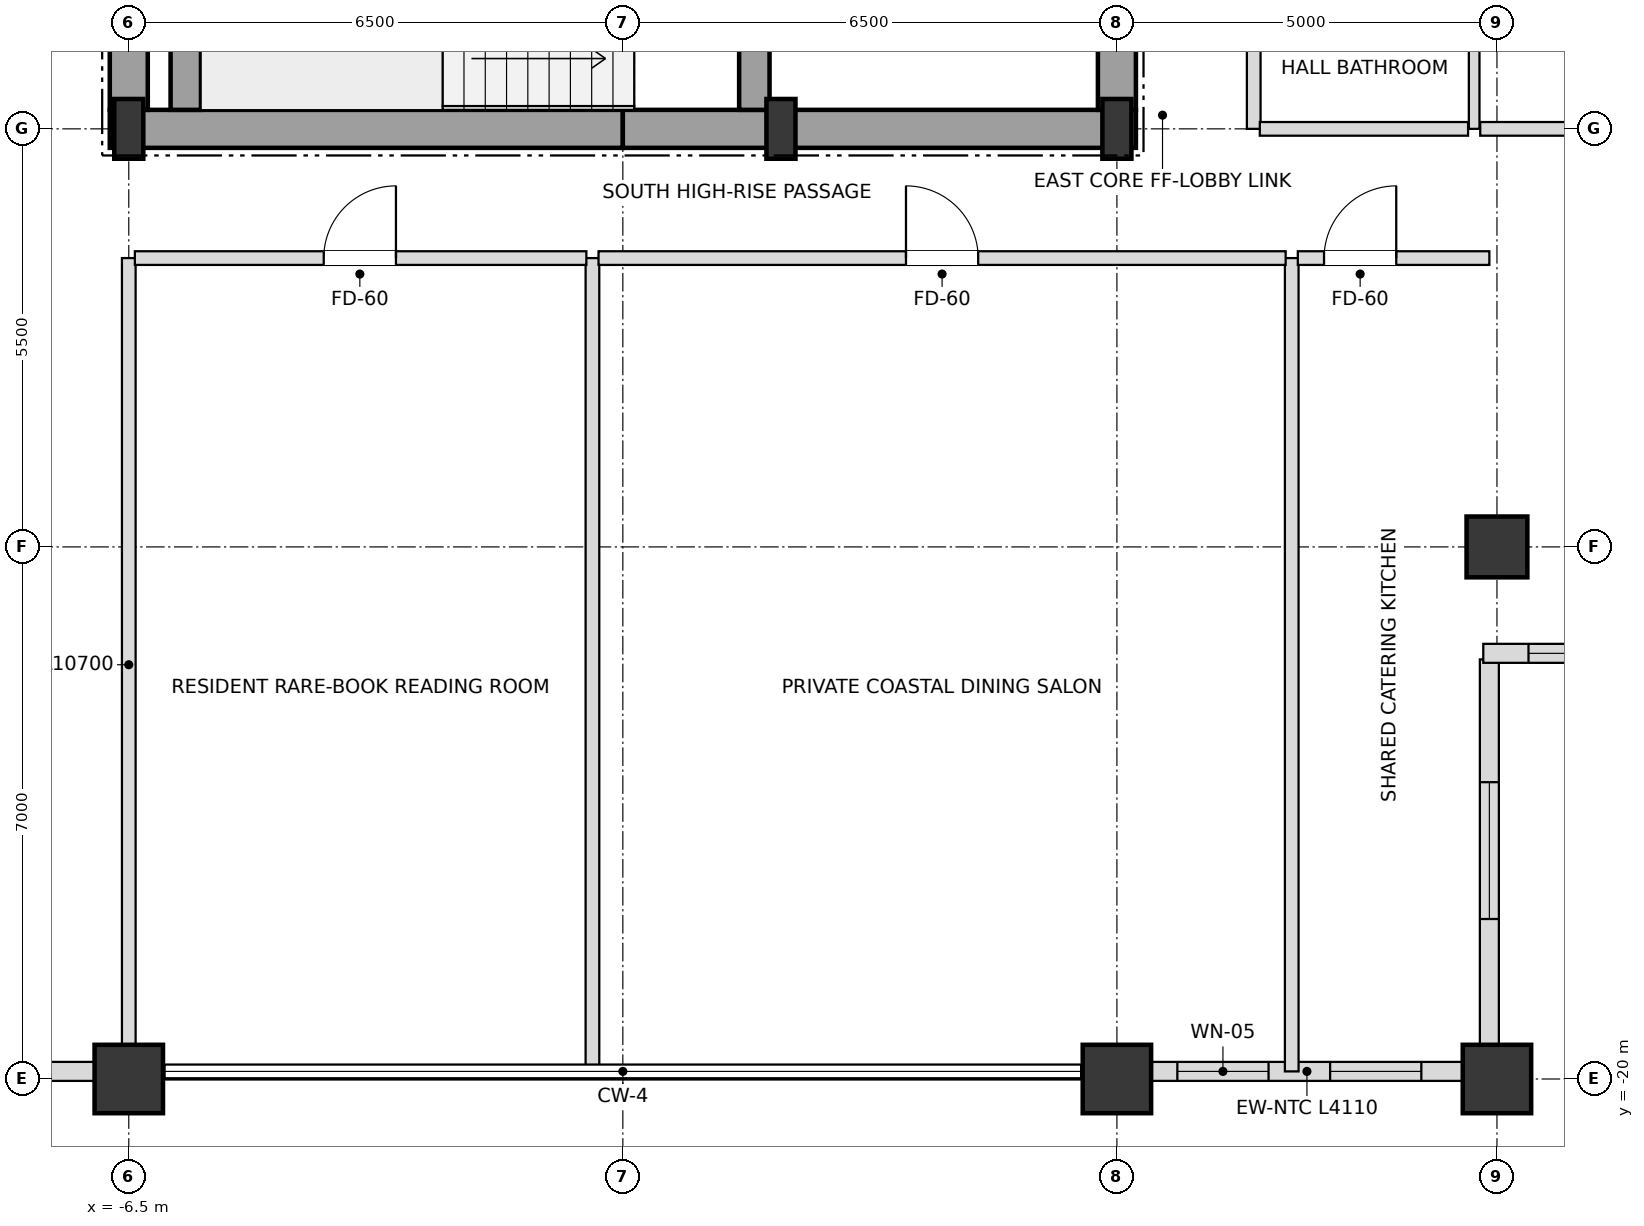
"""IFC4 building model, lengths in metres.
Left out: names, types, materials, properties, quantities, classifications, styles, units other than length and angle.
Written with IfcOpenShell. Run it as: python <this file> out.ifc"""

import sys

from ifc_helpers import new_model, si_unit, direction, frame, frame_2d, origin, origin_2d, place, context, subcontext, project, spatial, rectangle, i_section, extrude, element, fill, save


model = new_model("IFC4")
c1 = context("Model", 3, precision=1e-05, world=origin(), true_north=direction((0.0, 1.0)))
c2 = subcontext(c1, "Body", "Model", "MODEL_VIEW")
j1 = project(units=[si_unit("LENGTHUNIT", "METRE"), si_unit("PLANEANGLEUNIT", "RADIAN")], contexts=[c1])
p1 = place(None, origin())
s1 = spatial("IfcSite", under=j1, at=p1, CompositionType="ELEMENT")
p2 = place(p1, origin())
s2 = spatial("IfcBuilding", under=s1, at=p2, CompositionType="ELEMENT")
p3 = place(p2, frame((0.0, 0.0, 279.9)))
s3 = spatial("IfcBuildingStorey", under=s2, at=p3, CompositionType="ELEMENT", Elevation=279.9)
for number, where, z_axis, x_axis in (
    (1, (-6.5, -7.5, 0.0), (0.0, 0.0, 1.0), (1.0, 0.0, 0.0)),
    (2, (2.08, -7.5, 0.0), (0.0, 0.0, 1.0), (1.0, 0.0, 0.0)),
    (3, (6.5, -7.5, 0.0), (0.0, 0.0, 1.0), (1.0, 0.0, 0.0)),
):
    element("IfcColumn", number, at=place(p3, frame(where, z_axis=z_axis, x_axis=x_axis)), inside=s3, PredefinedType="COLUMN", context=c2, shape_type="SweptSolid", body=[
        extrude(i_section(OverallWidth=0.382, OverallDepth=0.786, WebThickness=0.02, FlangeThickness=0.033, at=origin_2d()), origin(), (0.0, 0.0, 1.0), 3.6),
    ])
for number, where, z_axis, x_axis in (
    (4, (-6.5, -20.0, 0.0), (0.0, 0.0, 1.0), (1.0, 0.0, 0.0)),
    (5, (6.5, -20.0, 0.0), (0.0, 0.0, 1.0), (1.0, 0.0, 0.0)),
    (6, (11.5, -20.0, 0.0), (0.0, 0.0, 1.0), (1.0, 0.0, 0.0)),
):
    element("IfcColumn", number, at=place(p3, frame(where, z_axis=z_axis, x_axis=x_axis)), inside=s3, PredefinedType="USERDEFINED", context=c2, shape_type="SweptSolid", body=[
        extrude(rectangle(XDim=0.9, YDim=0.9, at=origin_2d()), origin(), (0.0, 0.0, 1.0), 3.6),
    ])
p4 = place(p3, frame((11.5, -13.0, 0.0), z_axis=(0.0, 0.0, 1.0), x_axis=(1.0, 0.0, 0.0)))
e7 = element("IfcColumn", 7, at=p4, inside=s3, PredefinedType="COLUMN", context=c2, shape_type="SweptSolid", body=[
    extrude(rectangle(XDim=0.8, YDim=0.8, at=origin_2d()), origin(), (0.0, 0.0, 1.0), 3.6),
])
p5 = place(p3, frame((-11.055, -19.9, 0.0), z_axis=(0.0, 0.0, 1.0), x_axis=(1.0, 0.0, 0.0)))
e8 = element("IfcWall", 8, at=p5, inside=s3, PredefinedType="SOLIDWALL", context=c2, shape_type="SweptSolid", body=[
    extrude(rectangle(XDim=4.11, YDim=0.25, at=frame_2d((2.055, 0.0))), origin(), (0.0, 0.0, 1.0), 2.748),
])
p6 = place(p5, frame((1.155, 0.0, 0.72)))
e9 = element("IfcOpeningElement", 9, at=p6, cuts=e8, PredefinedType="OPENING", context=c2, shape_type="SweptSolid", body=[
    extrude(rectangle(XDim=1.8, YDim=1.68, at=frame_2d((0.9, 0.84))), frame((0.0, 0.135, 0.0), z_axis=(0.0, -1.0, 0.0), x_axis=(1.0, 0.0, 0.0)), (0.0, 0.0, 1.0), 0.27),
])
p7 = place(p3, frame((6.945, -19.9, 0.0), z_axis=(0.0, 0.0, 1.0), x_axis=(1.0, 0.0, 0.0)))
e10 = element("IfcWall", 10, at=p7, inside=s3, PredefinedType="SOLIDWALL", context=c2, shape_type="SweptSolid", body=[
    extrude(rectangle(XDim=4.11, YDim=0.25, at=frame_2d((2.055, 0.0))), origin(), (0.0, 0.0, 1.0), 2.748),
])
p8 = place(p7, frame((0.35, 0.0, 0.72)))
e11 = element("IfcOpeningElement", 11, at=p8, cuts=e10, PredefinedType="OPENING", context=c2, shape_type="SweptSolid", body=[
    extrude(rectangle(XDim=1.2, YDim=1.68, at=frame_2d((0.6, 0.84))), frame((0.0, 0.135, 0.0), z_axis=(0.0, -1.0, 0.0), x_axis=(1.0, 0.0, 0.0)), (0.0, 0.0, 1.0), 0.27),
])
p9 = place(p7, frame((2.36, 0.0, 0.72)))
e12 = element("IfcOpeningElement", 12, at=p9, cuts=e10, PredefinedType="OPENING", context=c2, shape_type="SweptSolid", body=[
    extrude(rectangle(XDim=1.2, YDim=1.68, at=frame_2d((0.6, 0.84))), frame((0.0, 0.135, 0.0), z_axis=(0.0, -1.0, 0.0), x_axis=(1.0, 0.0, 0.0)), (0.0, 0.0, 1.0), 0.27),
])
p10 = place(p3, frame((11.4, -19.82, 0.0), z_axis=(0.0, 0.0, 1.0), x_axis=(0.0, 1.0, 0.0)))
e13 = element("IfcWall", 13, at=p10, inside=s3, PredefinedType="SOLIDWALL", context=c2, shape_type="SweptSolid", body=[
    extrude(rectangle(XDim=5.34, YDim=0.25, at=frame_2d((2.67, 0.0))), origin(), (0.0, 0.0, 1.0), 2.748),
])
p11 = place(p10, frame((1.925, 0.0, 0.72)))
e14 = element("IfcOpeningElement", 14, at=p11, cuts=e13, PredefinedType="OPENING", context=c2, shape_type="SweptSolid", body=[
    extrude(rectangle(XDim=1.8, YDim=1.68, at=frame_2d((0.9, 0.84))), frame((0.0, 0.135, 0.0), z_axis=(0.0, -1.0, 0.0), x_axis=(1.0, 0.0, 0.0)), (0.0, 0.0, 1.0), 0.27),
])
p12 = place(p3, frame((11.32, -14.4, 0.0), z_axis=(0.0, 0.0, 1.0), x_axis=(1.0, 0.0, 0.0)))
e15 = element("IfcWall", 15, at=p12, inside=s3, PredefinedType="SOLIDWALL", context=c2, shape_type="SweptSolid", body=[
    extrude(rectangle(XDim=5.66, YDim=0.25, at=frame_2d((2.83, 0.0))), origin(), (0.0, 0.0, 1.0), 2.748),
])
p13 = place(p12, frame((0.595, 0.0, 0.72)))
e16 = element("IfcOpeningElement", 16, at=p13, cuts=e15, PredefinedType="OPENING", context=c2, shape_type="SweptSolid", body=[
    extrude(rectangle(XDim=1.8, YDim=1.68, at=frame_2d((0.9, 0.84))), frame((0.0, 0.135, 0.0), z_axis=(0.0, -1.0, 0.0), x_axis=(1.0, 0.0, 0.0)), (0.0, 0.0, 1.0), 0.27),
])
p14 = place(p12, frame((3.265, 0.0, 0.72)))
e17 = element("IfcOpeningElement", 17, at=p14, cuts=e15, PredefinedType="OPENING", context=c2, shape_type="SweptSolid", body=[
    extrude(rectangle(XDim=1.8, YDim=1.68, at=frame_2d((0.9, 0.84))), frame((0.0, 0.135, 0.0), z_axis=(0.0, -1.0, 0.0), x_axis=(1.0, 0.0, 0.0)), (0.0, 0.0, 1.0), 0.27),
])
for number, where, z_axis, x_axis in (
    (18, (-6.75, -7.5, 0.0), (0.0, 0.0, 1.0), (1.0, 0.0, 0.0)),
    (19, (0.0, -7.5, 0.0), (0.0, 0.0, 1.0), (1.0, 0.0, 0.0)),
):
    element("IfcWall", number, at=place(p3, frame(where, z_axis=z_axis, x_axis=x_axis)), inside=s3, PredefinedType="SHEAR", context=c2, shape_type="SweptSolid", body=[
        extrude(rectangle(XDim=6.75, YDim=0.5, at=frame_2d((3.375, 0.0))), origin(), (0.0, 0.0, 1.0), 3.38),
    ])
p15 = place(p3, frame((-6.5, -7.25, 0.0), z_axis=(0.0, 0.0, 1.0), x_axis=(0.0, 1.0, 0.0)))
e20 = element("IfcWall", 20, at=p15, inside=s3, PredefinedType="SHEAR", context=c2, shape_type="SweptSolid", body=[
    extrude(rectangle(XDim=3.55, YDim=0.5, at=frame_2d((1.775, 0.0))), origin(), (0.0, 0.0, 1.0), 3.38),
])
p16 = place(p3, frame((6.5, -7.25, 0.0), z_axis=(0.0, 0.0, 1.0), x_axis=(0.0, 1.0, 0.0)))
e21 = element("IfcWall", 21, at=p16, inside=s3, PredefinedType="SHEAR", context=c2, shape_type="SweptSolid", body=[
    extrude(rectangle(XDim=5.75, YDim=0.5, at=frame_2d((2.875, 0.0))), origin(), (0.0, 0.0, 1.0), 3.38),
])
p17 = place(p16, frame((0.85, 0.0, 0.0)))
e22 = element("IfcOpeningElement", 22, at=p17, cuts=e21, PredefinedType="OPENING", context=c2, shape_type="SweptSolid", body=[
    extrude(rectangle(XDim=1.05, YDim=2.15, at=frame_2d((0.525, 1.075))), frame((0.0, 0.26, 0.0), z_axis=(0.0, -1.0, 0.0), x_axis=(1.0, 0.0, 0.0)), (0.0, 0.0, 1.0), 0.52),
])
p18 = place(p3, frame((-5.75, -7.25, 0.0), z_axis=(0.0, 0.0, 1.0), x_axis=(0.0, 1.0, 0.0)))
e23 = element("IfcWall", 23, at=p18, inside=s3, PredefinedType="SHEAR", context=c2, shape_type="SweptSolid", body=[
    extrude(rectangle(XDim=2.9, YDim=0.4, at=frame_2d((1.45, 0.0))), origin(), (0.0, 0.0, 1.0), 3.38),
])
p19 = place(p3, frame((1.73, -7.25, 0.0), z_axis=(0.0, 0.0, 1.0), x_axis=(0.0, 1.0, 0.0)))
e24 = element("IfcWall", 24, at=p19, inside=s3, PredefinedType="SHEAR", context=c2, shape_type="SweptSolid", body=[
    extrude(rectangle(XDim=3.3, YDim=0.4, at=frame_2d((1.65, 0.0))), origin(), (0.0, 0.0, 1.0), 3.38),
])
p20 = place(p19, frame((0.9, 0.0, 0.0)))
e25 = element("IfcOpeningElement", 25, at=p20, cuts=e24, PredefinedType="OPENING", context=c2, shape_type="SweptSolid", body=[
    extrude(rectangle(XDim=1.05, YDim=2.15, at=frame_2d((0.525, 1.075))), frame((0.0, 0.21, 0.0), z_axis=(0.0, -1.0, 0.0), x_axis=(1.0, 0.0, 0.0)), (0.0, 0.0, 1.0), 0.42),
])
p21 = place(p3, frame((-6.5, -19.9, 0.0), z_axis=(0.0, 0.0, 1.0), x_axis=(0.0, 1.0, 0.0)))
e26 = element("IfcWall", 26, at=p21, inside=s3, PredefinedType="PARTITIONING", context=c2, shape_type="SweptSolid", body=[
    extrude(rectangle(XDim=10.7, YDim=0.18, at=frame_2d((5.35, 0.0))), origin(), (0.0, 0.0, 1.0), 2.826),
])
p22 = place(p3, frame((-0.4, -19.9, 0.0), z_axis=(0.0, 0.0, 1.0), x_axis=(0.0, 1.0, 0.0)))
e27 = element("IfcWall", 27, at=p22, inside=s3, PredefinedType="PARTITIONING", context=c2, shape_type="SweptSolid", body=[
    extrude(rectangle(XDim=10.7, YDim=0.18, at=frame_2d((5.35, 0.0))), origin(), (0.0, 0.0, 1.0), 3.018),
])
p23 = place(p3, frame((8.3, -7.5, 0.0), z_axis=(0.0, 0.0, 1.0), x_axis=(0.0, 1.0, 0.0)))
e28 = element("IfcWall", 28, at=p23, inside=s3, PredefinedType="PARTITIONING", context=c2, shape_type="SweptSolid", body=[
    extrude(rectangle(XDim=15.0, YDim=0.18, at=frame_2d((7.5, 0.0))), origin(), (0.0, 0.0, 1.0), 3.38),
])
p24 = place(p23, frame((2.355, 0.0, 0.0)))
e29 = element("IfcOpeningElement", 29, at=p24, cuts=e28, PredefinedType="OPENING", context=c2, shape_type="SweptSolid", body=[
    extrude(rectangle(XDim=0.95, YDim=2.15, at=frame_2d((0.475, 1.075))), frame((0.0, 0.1, 0.0), z_axis=(0.0, -1.0, 0.0), x_axis=(1.0, 0.0, 0.0)), (0.0, 0.0, 1.0), 0.2),
])
p25 = place(p3, frame((8.8, -19.9, 0.0), z_axis=(0.0, 0.0, 1.0), x_axis=(0.0, 1.0, 0.0)))
e30 = element("IfcWall", 30, at=p25, inside=s3, PredefinedType="PARTITIONING", context=c2, shape_type="SweptSolid", body=[
    extrude(rectangle(XDim=10.7, YDim=0.18, at=frame_2d((5.35, 0.0))), origin(), (0.0, 0.0, 1.0), 2.826),
])
p26 = place(p3, frame((11.2, -7.5, 0.0), z_axis=(0.0, 0.0, 1.0), x_axis=(0.0, 1.0, 0.0)))
e31 = element("IfcWall", 31, at=p26, inside=s3, PredefinedType="PARTITIONING", context=c2, shape_type="SweptSolid", body=[
    extrude(rectangle(XDim=15.0, YDim=0.14, at=frame_2d((7.5, 0.0))), origin(), (0.0, 0.0, 1.0), 3.38),
])
p27 = place(p26, frame((3.475, 0.0, 0.0)))
e32 = element("IfcOpeningElement", 32, at=p27, cuts=e31, PredefinedType="OPENING", context=c2, shape_type="SweptSolid", body=[
    extrude(rectangle(XDim=0.95, YDim=2.1, at=frame_2d((0.475, 1.05))), frame((0.0, 0.08, 0.0), z_axis=(0.0, -1.0, 0.0), x_axis=(1.0, 0.0, 0.0)), (0.0, 0.0, 1.0), 0.16),
])
p28 = place(p3, frame((-6.42, -9.2, 0.0), z_axis=(0.0, 0.0, 1.0), x_axis=(1.0, 0.0, 0.0)))
e33 = element("IfcWall", 33, at=p28, inside=s3, PredefinedType="PARTITIONING", context=c2, shape_type="SweptSolid", body=[
    extrude(rectangle(XDim=5.94, YDim=0.18, at=frame_2d((2.97, 0.0))), origin(), (0.0, 0.0, 1.0), 3.38),
])
p29 = place(p28, frame((2.485, 0.0, 0.0)))
e34 = element("IfcOpeningElement", 34, at=p29, cuts=e33, PredefinedType="OPENING", context=c2, shape_type="SweptSolid", body=[
    extrude(rectangle(XDim=0.95, YDim=2.15, at=frame_2d((0.475, 1.075))), frame((0.0, 0.1, 0.0), z_axis=(0.0, -1.0, 0.0), x_axis=(1.0, 0.0, 0.0)), (0.0, 0.0, 1.0), 0.2),
])
p30 = place(p3, frame((-0.32, -9.2, 0.0), z_axis=(0.0, 0.0, 1.0), x_axis=(1.0, 0.0, 0.0)))
e35 = element("IfcWall", 35, at=p30, inside=s3, PredefinedType="PARTITIONING", context=c2, shape_type="SweptSolid", body=[
    extrude(rectangle(XDim=9.04, YDim=0.18, at=frame_2d((4.52, 0.0))), origin(), (0.0, 0.0, 1.0), 2.826),
])
p31 = place(p30, frame((4.045, 0.0, 0.0)))
e36 = element("IfcOpeningElement", 36, at=p31, cuts=e35, PredefinedType="OPENING", context=c2, shape_type="SweptSolid", body=[
    extrude(rectangle(XDim=0.95, YDim=2.15, at=frame_2d((0.475, 1.075))), frame((0.0, 0.1, 0.0), z_axis=(0.0, -1.0, 0.0), x_axis=(1.0, 0.0, 0.0)), (0.0, 0.0, 1.0), 0.2),
])
p32 = place(p3, frame((8.88, -9.2, 0.0), z_axis=(0.0, 0.0, 1.0), x_axis=(1.0, 0.0, 0.0)))
e37 = element("IfcWall", 37, at=p32, inside=s3, PredefinedType="PARTITIONING", context=c2, shape_type="SweptSolid", body=[
    extrude(rectangle(XDim=2.52, YDim=0.18, at=frame_2d((1.26, 0.0))), origin(), (0.0, 0.0, 1.0), 3.38),
])
p33 = place(p32, frame((0.345, 0.0, 0.0)))
e38 = element("IfcOpeningElement", 38, at=p33, cuts=e37, PredefinedType="OPENING", context=c2, shape_type="SweptSolid", body=[
    extrude(rectangle(XDim=0.95, YDim=2.15, at=frame_2d((0.475, 1.075))), frame((0.0, 0.1, 0.0), z_axis=(0.0, -1.0, 0.0), x_axis=(1.0, 0.0, 0.0)), (0.0, 0.0, 1.0), 0.2),
])
p34 = place(p3, frame((8.38, -7.5, 0.0), z_axis=(0.0, 0.0, 1.0), x_axis=(1.0, 0.0, 0.0)))
e39 = element("IfcWall", 39, at=p34, inside=s3, PredefinedType="PARTITIONING", context=c2, shape_type="SweptSolid", body=[
    extrude(rectangle(XDim=2.74, YDim=0.18, at=frame_2d((1.37, 0.0))), origin(), (0.0, 0.0, 1.0), 2.826),
])
p35 = place(p3, frame((11.28, -7.5, 0.0), z_axis=(0.0, 0.0, 1.0), x_axis=(1.0, 0.0, 0.0)))
e40 = element("IfcWall", 40, at=p35, inside=s3, PredefinedType="PARTITIONING", context=c2, shape_type="SweptSolid", body=[
    extrude(rectangle(XDim=5.62, YDim=0.18, at=frame_2d((2.81, 0.0))), origin(), (0.0, 0.0, 1.0), 2.826),
])
p36 = place(p8, origin())
e41 = element("IfcWindow", 41, at=p36, inside=s3, PartitioningType="SINGLE_PANEL", PredefinedType="WINDOW", context=c2, shape_type="SweptSolid", body=[
    extrude(rectangle(XDim=1.2, YDim=1.68, at=frame_2d((0.6, 0.84))), frame((0.0, 0.03, 0.0), z_axis=(0.0, -1.0, 0.0), x_axis=(1.0, 0.0, 0.0)), (0.0, 0.0, 1.0), 0.06),
])
fill(e11, e41)
p37 = place(p9, origin())
e42 = element("IfcWindow", 42, at=p37, inside=s3, PartitioningType="SINGLE_PANEL", PredefinedType="WINDOW", context=c2, shape_type="SweptSolid", body=[
    extrude(rectangle(XDim=1.2, YDim=1.68, at=frame_2d((0.6, 0.84))), frame((0.0, 0.03, 0.0), z_axis=(0.0, -1.0, 0.0), x_axis=(1.0, 0.0, 0.0)), (0.0, 0.0, 1.0), 0.06),
])
fill(e12, e42)
p38 = place(p11, origin())
e43 = element("IfcWindow", 43, at=p38, inside=s3, PartitioningType="SINGLE_PANEL", PredefinedType="WINDOW", context=c2, shape_type="SweptSolid", body=[
    extrude(rectangle(XDim=1.8, YDim=1.68, at=frame_2d((0.9, 0.84))), frame((0.0, 0.03, 0.0), z_axis=(0.0, -1.0, 0.0), x_axis=(1.0, 0.0, 0.0)), (0.0, 0.0, 1.0), 0.06),
])
fill(e14, e43)
p39 = place(p13, origin())
e44 = element("IfcWindow", 44, at=p39, inside=s3, PartitioningType="SINGLE_PANEL", PredefinedType="WINDOW", context=c2, shape_type="SweptSolid", body=[
    extrude(rectangle(XDim=1.8, YDim=1.68, at=frame_2d((0.9, 0.84))), frame((0.0, 0.03, 0.0), z_axis=(0.0, -1.0, 0.0), x_axis=(1.0, 0.0, 0.0)), (0.0, 0.0, 1.0), 0.06),
])
fill(e16, e44)
p40 = place(p29, origin())
e45 = element("IfcDoor", 45, at=p40, inside=s3, OperationType="SINGLE_SWING_RIGHT", PredefinedType="DOOR", context=c2, shape_type="SweptSolid", body=[
    extrude(rectangle(XDim=0.95, YDim=2.15, at=frame_2d((0.475, 1.075))), frame((0.0, 0.025, 0.0), z_axis=(0.0, -1.0, 0.0), x_axis=(1.0, 0.0, 0.0)), (0.0, 0.0, 1.0), 0.05),
])
fill(e34, e45)
p41 = place(p31, origin())
e46 = element("IfcDoor", 46, at=p41, inside=s3, OperationType="SINGLE_SWING_LEFT", PredefinedType="DOOR", context=c2, shape_type="SweptSolid", body=[
    extrude(rectangle(XDim=0.95, YDim=2.15, at=frame_2d((0.475, 1.075))), frame((0.0, 0.025, 0.0), z_axis=(0.0, -1.0, 0.0), x_axis=(1.0, 0.0, 0.0)), (0.0, 0.0, 1.0), 0.05),
])
fill(e36, e46)
p42 = place(p33, origin())
e47 = element("IfcDoor", 47, at=p42, inside=s3, OperationType="SINGLE_SWING_RIGHT", PredefinedType="DOOR", context=c2, shape_type="SweptSolid", body=[
    extrude(rectangle(XDim=0.95, YDim=2.15, at=frame_2d((0.475, 1.075))), frame((0.0, 0.025, 0.0), z_axis=(0.0, -1.0, 0.0), x_axis=(1.0, 0.0, 0.0)), (0.0, 0.0, 1.0), 0.05),
])
fill(e38, e47)
save(model, sys.argv[1])
